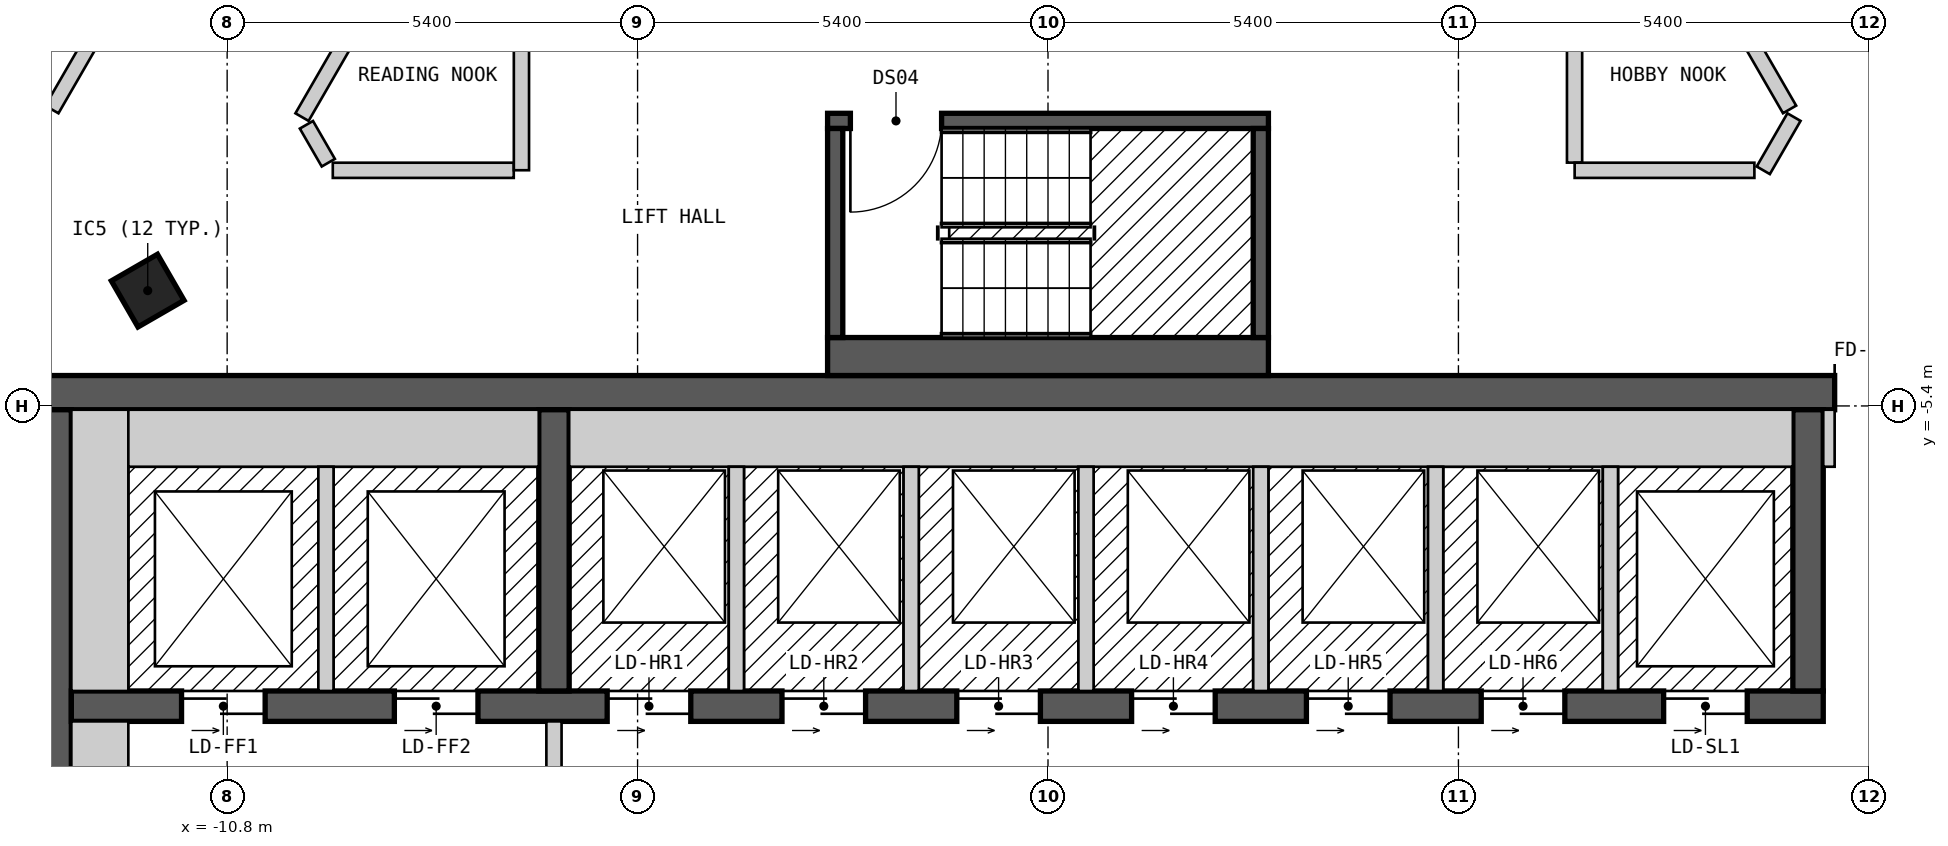
"""IFC4 building model, lengths in metres.
Left out: names, types, materials, properties, quantities, classifications, styles, units other than length and angle.
Written with IfcOpenShell. Run it as: python <this file> out.ifc"""

import sys

from ifc_helpers import new_model, si_unit, direction, frame, frame_2d, origin, origin_2d, place, context, subcontext, project, spatial, rectangle, extrude, element, fill, save


model = new_model("IFC4")
c1 = context("Model", 3, precision=1e-05, world=origin(), true_north=direction((0.0, 1.0)))
c2 = subcontext(c1, "Body", "Model", "MODEL_VIEW")
j1 = project(units=[si_unit("LENGTHUNIT", "METRE"), si_unit("PLANEANGLEUNIT", "RADIAN")], contexts=[c1])
p1 = place(None, origin())
s1 = spatial("IfcSite", under=j1, at=p1, CompositionType="ELEMENT")
p2 = place(p1, origin())
s2 = spatial("IfcBuilding", under=s1, at=p2, CompositionType="ELEMENT")
p3 = place(p2, frame((0.0, 0.0, 229.8)))
s3 = spatial("IfcBuildingStorey", under=s2, at=p3, CompositionType="ELEMENT", Elevation=229.8)
p4 = place(p3, frame((-11.845, -3.883, 0.0), z_axis=(0.0, 0.0, 1.0), x_axis=(0.499984884929, -0.866034130299, 0.0)))
e1 = element("IfcColumn", 1, at=p4, inside=s3, PredefinedType="COLUMN", context=c2, shape_type="SweptSolid", body=[
    extrude(rectangle(XDim=0.7, YDim=0.7, at=origin_2d()), origin(), (0.0, 0.0, 1.0), 3.0),
])
p5 = place(p3, frame((-13.3, -5.225, 0.0), z_axis=(0.0, 0.0, 1.0), x_axis=(1.0, 0.0, 0.0)))
e2 = element("IfcWall", 2, at=p5, inside=s3, PredefinedType="SHEAR", context=c2, shape_type="SweptSolid", body=[
    extrude(rectangle(XDim=26.6, YDim=0.45, at=frame_2d((13.3, 0.0))), origin(), (0.0, 0.0, 1.0), 2.7),
])
p6 = place(p5, frame((23.65, 0.0, 0.0)))
e3 = element("IfcOpeningElement", 3, at=p6, cuts=e2, PredefinedType="OPENING", context=c2, shape_type="SweptSolid", body=[
    extrude(rectangle(XDim=1.2, YDim=2.1, at=frame_2d((0.6, 1.05))), frame((0.0, 0.235, 0.0), z_axis=(0.0, -1.0, 0.0), x_axis=(1.0, 0.0, 0.0)), (0.0, 0.0, 1.0), 0.47),
])
p7 = place(p3, frame((-13.075, -18.55, 0.0), z_axis=(0.0, 0.0, 1.0), x_axis=(0.0, 1.0, 0.0)))
e4 = element("IfcWall", 4, at=p7, inside=s3, PredefinedType="SHEAR", context=c2, shape_type="SweptSolid", body=[
    extrude(rectangle(XDim=13.1, YDim=0.45, at=frame_2d((6.55, 0.0))), origin(), (0.0, 0.0, 1.0), 2.7),
])
p8 = place(p7, frame((4.35, 0.0, 0.0)))
e5 = element("IfcOpeningElement", 5, at=p8, cuts=e4, PredefinedType="OPENING", context=c2, shape_type="SweptSolid", body=[
    extrude(rectangle(XDim=1.2, YDim=2.1, at=frame_2d((0.6, 1.05))), frame((0.0, 0.235, 0.0), z_axis=(0.0, -1.0, 0.0), x_axis=(1.0, 0.0, 0.0)), (0.0, 0.0, 1.0), 0.47),
])
p9 = place(p3, frame((-12.85, -9.35, 0.0), z_axis=(0.0, 0.0, 1.0), x_axis=(1.0, 0.0, 0.0)))
e6 = element("IfcWall", 6, at=p9, inside=s3, PredefinedType="SHEAR", context=c2, shape_type="SweptSolid", body=[
    extrude(rectangle(XDim=23.05, YDim=0.4, at=frame_2d((11.525, 0.0))), origin(), (0.0, 0.0, 1.0), 2.7),
])
p10 = place(p9, frame((1.45, 0.0, 0.0)))
e7 = element("IfcOpeningElement", 7, at=p10, cuts=e6, PredefinedType="OPENING", context=c2, shape_type="SweptSolid", body=[
    extrude(rectangle(XDim=1.1, YDim=2.1, at=frame_2d((0.55, 1.05))), frame((0.0, 0.21, 0.0), z_axis=(0.0, -1.0, 0.0), x_axis=(1.0, 0.0, 0.0)), (0.0, 0.0, 1.0), 0.42),
])
p11 = place(p9, frame((4.25, 0.0, 0.0)))
e8 = element("IfcOpeningElement", 8, at=p11, cuts=e6, PredefinedType="OPENING", context=c2, shape_type="SweptSolid", body=[
    extrude(rectangle(XDim=1.1, YDim=2.1, at=frame_2d((0.55, 1.05))), frame((0.0, 0.21, 0.0), z_axis=(0.0, -1.0, 0.0), x_axis=(1.0, 0.0, 0.0)), (0.0, 0.0, 1.0), 0.42),
])
p12 = place(p9, frame((7.05, 0.0, 0.0)))
e9 = element("IfcOpeningElement", 9, at=p12, cuts=e6, PredefinedType="OPENING", context=c2, shape_type="SweptSolid", body=[
    extrude(rectangle(XDim=1.1, YDim=2.1, at=frame_2d((0.55, 1.05))), frame((0.0, 0.21, 0.0), z_axis=(0.0, -1.0, 0.0), x_axis=(1.0, 0.0, 0.0)), (0.0, 0.0, 1.0), 0.42),
])
p13 = place(p9, frame((9.35, 0.0, 0.0)))
e10 = element("IfcOpeningElement", 10, at=p13, cuts=e6, PredefinedType="OPENING", context=c2, shape_type="SweptSolid", body=[
    extrude(rectangle(XDim=1.1, YDim=2.1, at=frame_2d((0.55, 1.05))), frame((0.0, 0.21, 0.0), z_axis=(0.0, -1.0, 0.0), x_axis=(1.0, 0.0, 0.0)), (0.0, 0.0, 1.0), 0.42),
])
p14 = place(p9, frame((11.65, 0.0, 0.0)))
e11 = element("IfcOpeningElement", 11, at=p14, cuts=e6, PredefinedType="OPENING", context=c2, shape_type="SweptSolid", body=[
    extrude(rectangle(XDim=1.1, YDim=2.1, at=frame_2d((0.55, 1.05))), frame((0.0, 0.21, 0.0), z_axis=(0.0, -1.0, 0.0), x_axis=(1.0, 0.0, 0.0)), (0.0, 0.0, 1.0), 0.42),
])
p15 = place(p9, frame((13.95, 0.0, 0.0)))
e12 = element("IfcOpeningElement", 12, at=p15, cuts=e6, PredefinedType="OPENING", context=c2, shape_type="SweptSolid", body=[
    extrude(rectangle(XDim=1.1, YDim=2.1, at=frame_2d((0.55, 1.05))), frame((0.0, 0.21, 0.0), z_axis=(0.0, -1.0, 0.0), x_axis=(1.0, 0.0, 0.0)), (0.0, 0.0, 1.0), 0.42),
])
p16 = place(p9, frame((16.25, 0.0, 0.0)))
e13 = element("IfcOpeningElement", 13, at=p16, cuts=e6, PredefinedType="OPENING", context=c2, shape_type="SweptSolid", body=[
    extrude(rectangle(XDim=1.1, YDim=2.1, at=frame_2d((0.55, 1.05))), frame((0.0, 0.21, 0.0), z_axis=(0.0, -1.0, 0.0), x_axis=(1.0, 0.0, 0.0)), (0.0, 0.0, 1.0), 0.42),
])
p17 = place(p9, frame((18.55, 0.0, 0.0)))
e14 = element("IfcOpeningElement", 14, at=p17, cuts=e6, PredefinedType="OPENING", context=c2, shape_type="SweptSolid", body=[
    extrude(rectangle(XDim=1.1, YDim=2.1, at=frame_2d((0.55, 1.05))), frame((0.0, 0.21, 0.0), z_axis=(0.0, -1.0, 0.0), x_axis=(1.0, 0.0, 0.0)), (0.0, 0.0, 1.0), 0.42),
])
p18 = place(p9, frame((20.95, 0.0, 0.0)))
e15 = element("IfcOpeningElement", 15, at=p18, cuts=e6, PredefinedType="OPENING", context=c2, shape_type="SweptSolid", body=[
    extrude(rectangle(XDim=1.1, YDim=2.1, at=frame_2d((0.55, 1.05))), frame((0.0, 0.21, 0.0), z_axis=(0.0, -1.0, 0.0), x_axis=(1.0, 0.0, 0.0)), (0.0, 0.0, 1.0), 0.42),
])
for number, where, z_axis, x_axis in (
    (16, (-6.5, -9.15, 0.0), (0.0, 0.0, 1.0), (0.0, 1.0, 0.0)),
    (17, (10.0, -9.15, 0.0), (0.0, 0.0, 1.0), (0.0, 1.0, 0.0)),
):
    element("IfcWall", number, at=place(p3, frame(where, z_axis=z_axis, x_axis=x_axis)), inside=s3, PredefinedType="SHEAR", context=c2, shape_type="SweptSolid", body=[
        extrude(rectangle(XDim=3.7, YDim=0.4, at=frame_2d((1.85, 0.0))), origin(), (0.0, 0.0, 1.0), 2.7),
    ])
p19 = place(p3, frame((-2.9, -4.75, 0.0), z_axis=(0.0, 0.0, 1.0), x_axis=(1.0, 0.0, 0.0)))
e18 = element("IfcWall", 18, at=p19, inside=s3, PredefinedType="SOLIDWALL", context=c2, shape_type="SweptSolid", body=[
    extrude(rectangle(XDim=5.8, YDim=0.5, at=frame_2d((2.9, 0.0))), origin(), (0.0, 0.0, 1.0), 2.7),
])
p20 = place(p3, frame((-2.9, -1.65, 0.0), z_axis=(0.0, 0.0, 1.0), x_axis=(1.0, 0.0, 0.0)))
e19 = element("IfcWall", 19, at=p20, inside=s3, PredefinedType="SOLIDWALL", context=c2, shape_type="SweptSolid", body=[
    extrude(rectangle(XDim=5.8, YDim=0.2, at=frame_2d((2.9, 0.0))), origin(), (0.0, 0.0, 1.0), 2.7),
])
p21 = place(p20, frame((0.3, 0.0, 0.0)))
e20 = element("IfcOpeningElement", 20, at=p21, cuts=e19, PredefinedType="OPENING", context=c2, shape_type="SweptSolid", body=[
    extrude(rectangle(XDim=1.2, YDim=2.1, at=frame_2d((0.6, 1.05))), frame((0.0, 0.11, 0.0), z_axis=(0.0, -1.0, 0.0), x_axis=(1.0, 0.0, 0.0)), (0.0, 0.0, 1.0), 0.22),
])
for number, where, z_axis, x_axis in (
    (21, (-2.8, -4.5, 0.0), (0.0, 0.0, 1.0), (0.0, 1.0, 0.0)),
    (22, (2.8, -4.5, 0.0), (0.0, 0.0, 1.0), (0.0, 1.0, 0.0)),
):
    element("IfcWall", number, at=place(p3, frame(where, z_axis=z_axis, x_axis=x_axis)), inside=s3, PredefinedType="SOLIDWALL", context=c2, shape_type="SweptSolid", body=[
        extrude(rectangle(XDim=2.75, YDim=0.2, at=frame_2d((1.375, 0.0))), origin(), (0.0, 0.0, 1.0), 2.7),
    ])
p22 = place(p3, frame((-9.757, -1.701, 0.0), z_axis=(0.0, 0.0, 1.0), x_axis=(0.49996696679, -0.866044474677, 0.0)))
e23 = element("IfcWall", 23, at=p22, inside=s3, PredefinedType="PARTITIONING", context=c2, shape_type="SweptSolid", body=[
    extrude(rectangle(XDim=0.576, YDim=0.2, at=frame_2d((0.288, 0.0))), origin(), (0.0, 0.0, 1.0), 2.7),
])
p23 = place(p3, frame((7.622, 2.199, 0.0), z_axis=(0.0, 0.0, 1.0), x_axis=(0.499994660107, -0.866028486751, 0.0)))
e24 = element("IfcWall", 24, at=p23, inside=s3, PredefinedType="PARTITIONING", context=c2, shape_type="SweptSolid", body=[
    extrude(rectangle(XDim=4.27, YDim=0.2, at=frame_2d((2.135, 0.0))), origin(), (0.0, 0.0, 1.0), 2.7),
])
p24 = place(p23, frame((1.685, 0.0, 0.0)))
e25 = element("IfcOpeningElement", 25, at=p24, cuts=e24, PredefinedType="OPENING", context=c2, shape_type="SweptSolid", body=[
    extrude(rectangle(XDim=0.9, YDim=2.1, at=frame_2d((0.45, 1.05))), frame((0.0, 0.11, 0.0), z_axis=(0.0, -1.0, 0.0), x_axis=(1.0, 0.0, 0.0)), (0.0, 0.0, 1.0), 0.22),
])
p25 = place(p3, frame((9.238, 5.2, 0.0), z_axis=(0.0, 0.0, 1.0), x_axis=(0.500025705601, -0.86601056214, 0.0)))
e26 = element("IfcWall", 26, at=p25, inside=s3, PredefinedType="PARTITIONING", context=c2, shape_type="SweptSolid", body=[
    extrude(rectangle(XDim=7.735, YDim=0.2, at=frame_2d((3.868, 0.0))), origin(), (0.0, 0.0, 1.0), 2.7),
])
p26 = place(p25, frame((6.898, 0.0, 0.0)))
e27 = element("IfcOpeningElement", 27, at=p26, cuts=e26, PredefinedType="OPENING", context=c2, shape_type="SweptSolid", body=[
    extrude(rectangle(XDim=0.8, YDim=2.1, at=frame_2d((0.4, 1.05))), frame((0.0, 0.11, 0.0), z_axis=(0.0, -1.0, 0.0), x_axis=(1.0, 0.0, 0.0)), (0.0, 0.0, 1.0), 0.22),
])
p27 = place(p25, frame((1.988, 0.0, 0.0)))
e28 = element("IfcOpeningElement", 28, at=p27, cuts=e26, PredefinedType="OPENING", context=c2, shape_type="SweptSolid", body=[
    extrude(rectangle(XDim=1.0, YDim=2.1, at=frame_2d((0.5, 1.05))), frame((0.0, 0.11, 0.0), z_axis=(0.0, -1.0, 0.0), x_axis=(1.0, 0.0, 0.0)), (0.0, 0.0, 1.0), 0.22),
])
p28 = place(p3, frame((6.928, 1.0, 0.0), z_axis=(0.0, 0.0, 1.0), x_axis=(0.0, -1.0, 0.0)))
e29 = element("IfcWall", 29, at=p28, inside=s3, PredefinedType="PARTITIONING", context=c2, shape_type="SweptSolid", body=[
    extrude(rectangle(XDim=3.199, YDim=0.2, at=frame_2d((1.6, 0.0))), origin(), (0.0, 0.0, 1.0), 2.7),
])
p29 = place(p3, frame((-9.41, -2.3, 0.0), z_axis=(0.0, 0.0, 1.0), x_axis=(1.0, 0.0, 0.0)))
e30 = element("IfcWall", 30, at=p29, inside=s3, PredefinedType="PARTITIONING", context=c2, shape_type="SweptSolid", body=[
    extrude(rectangle(XDim=2.381, YDim=0.2, at=frame_2d((1.19, 0.0))), origin(), (0.0, 0.0, 1.0), 2.7),
])
p30 = place(p3, frame((6.929, -2.3, 0.0), z_axis=(0.0, 0.0, 1.0), x_axis=(1.0, 0.0, 0.0)))
e31 = element("IfcWall", 31, at=p30, inside=s3, PredefinedType="PARTITIONING", context=c2, shape_type="SweptSolid", body=[
    extrude(rectangle(XDim=2.365, YDim=0.2, at=frame_2d((1.183, 0.0))), origin(), (0.0, 0.0, 1.0), 2.7),
])
p31 = place(p3, frame((9.411, -2.3, 0.0), z_axis=(0.0, 0.0, 1.0), x_axis=(0.499940363534, 0.866059832176, 0.0)))
e32 = element("IfcWall", 32, at=p31, inside=s3, PredefinedType="PARTITIONING", context=c2, shape_type="SweptSolid", body=[
    extrude(rectangle(XDim=0.808, YDim=0.2, at=frame_2d((0.404, 0.0))), origin(), (0.0, 0.0, 1.0), 2.7),
])
p32 = place(p3, frame((-9.815, -1.6, 0.0), z_axis=(0.0, 0.0, 1.0), x_axis=(0.500058909736, 0.865991389561, 0.0)))
e33 = element("IfcWall", 33, at=p32, inside=s3, PredefinedType="PARTITIONING", context=c2, shape_type="SweptSolid", body=[
    extrude(rectangle(XDim=4.501, YDim=0.2, at=frame_2d((2.251, 0.0))), origin(), (0.0, 0.0, 1.0), 2.7),
])
p33 = place(p32, frame((1.801, 0.0, 0.0)))
e34 = element("IfcOpeningElement", 34, at=p33, cuts=e33, PredefinedType="OPENING", context=c2, shape_type="SweptSolid", body=[
    extrude(rectangle(XDim=0.9, YDim=2.1, at=frame_2d((0.45, 1.05))), frame((0.0, 0.11, 0.0), z_axis=(0.0, -1.0, 0.0), x_axis=(1.0, 0.0, 0.0)), (0.0, 0.0, 1.0), 0.22),
])
p34 = place(p3, frame((-13.106, -1.5, 0.0), z_axis=(0.0, 0.0, 1.0), x_axis=(0.500025705601, 0.86601056214, 0.0)))
e35 = element("IfcWall", 35, at=p34, inside=s3, PredefinedType="PARTITIONING", context=c2, shape_type="SweptSolid", body=[
    extrude(rectangle(XDim=7.735, YDim=0.2, at=frame_2d((3.868, 0.0))), origin(), (0.0, 0.0, 1.0), 2.7),
])
p35 = place(p3, frame((-6.928, -2.299, 0.0), z_axis=(0.0, 0.0, 1.0), x_axis=(0.0, 1.0, 0.0)))
e36 = element("IfcWall", 36, at=p35, inside=s3, PredefinedType="PARTITIONING", context=c2, shape_type="SweptSolid", body=[
    extrude(rectangle(XDim=3.499, YDim=0.2, at=frame_2d((1.75, 0.0))), origin(), (0.0, 0.0, 1.0), 2.7),
])
p36 = place(p3, frame((-12.475, -13.0, 0.0), z_axis=(0.0, 0.0, 1.0), x_axis=(0.0, 1.0, 0.0)))
e37 = element("IfcWall", 37, at=p36, inside=s3, PredefinedType="PARTITIONING", context=c2, shape_type="SweptSolid", body=[
    extrude(rectangle(XDim=3.45, YDim=0.75, at=frame_2d((1.725, 0.0))), origin(), (0.0, 0.0, 1.0), 2.7),
])
p37 = place(p3, frame((-12.475, -9.15, 0.0), z_axis=(0.0, 0.0, 1.0), x_axis=(0.0, 1.0, 0.0)))
e38 = element("IfcWall", 38, at=p37, inside=s3, PredefinedType="SOLIDWALL", context=c2, shape_type="SweptSolid", body=[
    extrude(rectangle(XDim=3.7, YDim=0.75, at=frame_2d((1.85, 0.0))), origin(), (0.0, 0.0, 1.0), 2.7),
])
p38 = place(p3, frame((-12.1, -5.825, 0.0), z_axis=(0.0, 0.0, 1.0), x_axis=(1.0, 0.0, 0.0)))
e39 = element("IfcWall", 39, at=p38, inside=s3, PredefinedType="SOLIDWALL", context=c2, shape_type="SweptSolid", body=[
    extrude(rectangle(XDim=5.4, YDim=0.75, at=frame_2d((2.7, 0.0))), origin(), (0.0, 0.0, 1.0), 2.7),
])
p39 = place(p3, frame((-9.5, -9.15, 0.0), z_axis=(0.0, 0.0, 1.0), x_axis=(0.0, 1.0, 0.0)))
e40 = element("IfcWall", 40, at=p39, inside=s3, PredefinedType="SOLIDWALL", context=c2, shape_type="SweptSolid", body=[
    extrude(rectangle(XDim=2.95, YDim=0.2, at=frame_2d((1.475, 0.0))), origin(), (0.0, 0.0, 1.0), 2.7),
])
p40 = place(p3, frame((-6.5, -14.45, 0.0), z_axis=(0.0, 0.0, 1.0), x_axis=(0.0, 1.0, 0.0)))
e41 = element("IfcWall", 41, at=p40, inside=s3, PredefinedType="PARTITIONING", context=c2, shape_type="SweptSolid", body=[
    extrude(rectangle(XDim=4.9, YDim=0.2, at=frame_2d((2.45, 0.0))), origin(), (0.0, 0.0, 1.0), 2.7),
])
p41 = place(p40, frame((3.15, 0.0, 0.0), z_axis=(0.0, 0.0, 1.0), x_axis=(-1.0, 0.0, 0.0)))
e42 = element("IfcOpeningElement", 42, at=p41, cuts=e41, PredefinedType="OPENING", context=c2, shape_type="SweptSolid", body=[
    extrude(rectangle(XDim=1.4, YDim=2.1, at=frame_2d((0.7, 1.05))), frame((0.0, 0.11, 0.0), z_axis=(0.0, -1.0, 0.0), x_axis=(1.0, 0.0, 0.0)), (0.0, 0.0, 1.0), 0.22),
])
p42 = place(p3, frame((-6.3, -5.825, 0.0), z_axis=(0.0, 0.0, 1.0), x_axis=(1.0, 0.0, 0.0)))
e43 = element("IfcWall", 43, at=p42, inside=s3, PredefinedType="SOLIDWALL", context=c2, shape_type="SweptSolid", body=[
    extrude(rectangle(XDim=16.1, YDim=0.75, at=frame_2d((8.05, 0.0))), origin(), (0.0, 0.0, 1.0), 2.7),
])
for number, where, z_axis, x_axis in (
    (44, (-4.1, -9.15, 0.0), (0.0, 0.0, 1.0), (0.0, 1.0, 0.0)),
    (45, (-1.8, -9.15, 0.0), (0.0, 0.0, 1.0), (0.0, 1.0, 0.0)),
    (46, (0.5, -9.15, 0.0), (0.0, 0.0, 1.0), (0.0, 1.0, 0.0)),
    (47, (2.8, -9.15, 0.0), (0.0, 0.0, 1.0), (0.0, 1.0, 0.0)),
    (48, (5.1, -9.15, 0.0), (0.0, 0.0, 1.0), (0.0, 1.0, 0.0)),
    (49, (7.4, -9.15, 0.0), (0.0, 0.0, 1.0), (0.0, 1.0, 0.0)),
):
    element("IfcWall", number, at=place(p3, frame(where, z_axis=z_axis, x_axis=x_axis)), inside=s3, PredefinedType="SOLIDWALL", context=c2, shape_type="SweptSolid", body=[
        extrude(rectangle(XDim=2.95, YDim=0.2, at=frame_2d((1.475, 0.0))), origin(), (0.0, 0.0, 1.0), 2.7),
    ])
p43 = place(p3, frame((10.275, -6.2, 0.0), z_axis=(0.0, 0.0, 1.0), x_axis=(0.0, 1.0, 0.0)))
e50 = element("IfcWall", 50, at=p43, inside=s3, PredefinedType="PARTITIONING", context=c2, shape_type="SweptSolid", body=[
    extrude(rectangle(XDim=0.75, YDim=0.15, at=frame_2d((0.375, 0.0))), origin(), (0.0, 0.0, 1.0), 2.7),
])
p44 = place(p21, origin())
e51 = element("IfcDoor", 51, at=p44, inside=s3, OperationType="SINGLE_SWING_LEFT", PredefinedType="DOOR", context=c2, shape_type="SweptSolid", body=[
    extrude(rectangle(XDim=1.2, YDim=2.1, at=frame_2d((0.6, 1.05))), frame((0.0, 0.025, 0.0), z_axis=(0.0, -1.0, 0.0), x_axis=(1.0, 0.0, 0.0)), (0.0, 0.0, 1.0), 0.05),
])
fill(e20, e51)
p45 = place(p10, origin())
e52 = element("IfcDoor", 52, at=p45, inside=s3, OperationType="DOUBLE_DOOR_SLIDING", PredefinedType="DOOR", context=c2, shape_type="SweptSolid", body=[
    extrude(rectangle(XDim=1.1, YDim=2.1, at=frame_2d((0.55, 1.05))), frame((0.0, 0.025, 0.0), z_axis=(0.0, -1.0, 0.0), x_axis=(1.0, 0.0, 0.0)), (0.0, 0.0, 1.0), 0.05),
])
fill(e7, e52)
p46 = place(p11, origin())
e53 = element("IfcDoor", 53, at=p46, inside=s3, OperationType="DOUBLE_DOOR_SLIDING", PredefinedType="DOOR", context=c2, shape_type="SweptSolid", body=[
    extrude(rectangle(XDim=1.1, YDim=2.1, at=frame_2d((0.55, 1.05))), frame((0.0, 0.025, 0.0), z_axis=(0.0, -1.0, 0.0), x_axis=(1.0, 0.0, 0.0)), (0.0, 0.0, 1.0), 0.05),
])
fill(e8, e53)
p47 = place(p12, origin())
e54 = element("IfcDoor", 54, at=p47, inside=s3, OperationType="DOUBLE_DOOR_SLIDING", PredefinedType="DOOR", context=c2, shape_type="SweptSolid", body=[
    extrude(rectangle(XDim=1.1, YDim=2.1, at=frame_2d((0.55, 1.05))), frame((0.0, 0.025, 0.0), z_axis=(0.0, -1.0, 0.0), x_axis=(1.0, 0.0, 0.0)), (0.0, 0.0, 1.0), 0.05),
])
fill(e9, e54)
p48 = place(p13, origin())
e55 = element("IfcDoor", 55, at=p48, inside=s3, OperationType="DOUBLE_DOOR_SLIDING", PredefinedType="DOOR", context=c2, shape_type="SweptSolid", body=[
    extrude(rectangle(XDim=1.1, YDim=2.1, at=frame_2d((0.55, 1.05))), frame((0.0, 0.025, 0.0), z_axis=(0.0, -1.0, 0.0), x_axis=(1.0, 0.0, 0.0)), (0.0, 0.0, 1.0), 0.05),
])
fill(e10, e55)
p49 = place(p14, origin())
e56 = element("IfcDoor", 56, at=p49, inside=s3, OperationType="DOUBLE_DOOR_SLIDING", PredefinedType="DOOR", context=c2, shape_type="SweptSolid", body=[
    extrude(rectangle(XDim=1.1, YDim=2.1, at=frame_2d((0.55, 1.05))), frame((0.0, 0.025, 0.0), z_axis=(0.0, -1.0, 0.0), x_axis=(1.0, 0.0, 0.0)), (0.0, 0.0, 1.0), 0.05),
])
fill(e11, e56)
p50 = place(p15, origin())
e57 = element("IfcDoor", 57, at=p50, inside=s3, OperationType="DOUBLE_DOOR_SLIDING", PredefinedType="DOOR", context=c2, shape_type="SweptSolid", body=[
    extrude(rectangle(XDim=1.1, YDim=2.1, at=frame_2d((0.55, 1.05))), frame((0.0, 0.025, 0.0), z_axis=(0.0, -1.0, 0.0), x_axis=(1.0, 0.0, 0.0)), (0.0, 0.0, 1.0), 0.05),
])
fill(e12, e57)
p51 = place(p16, origin())
e58 = element("IfcDoor", 58, at=p51, inside=s3, OperationType="DOUBLE_DOOR_SLIDING", PredefinedType="DOOR", context=c2, shape_type="SweptSolid", body=[
    extrude(rectangle(XDim=1.1, YDim=2.1, at=frame_2d((0.55, 1.05))), frame((0.0, 0.025, 0.0), z_axis=(0.0, -1.0, 0.0), x_axis=(1.0, 0.0, 0.0)), (0.0, 0.0, 1.0), 0.05),
])
fill(e13, e58)
p52 = place(p17, origin())
e59 = element("IfcDoor", 59, at=p52, inside=s3, OperationType="DOUBLE_DOOR_SLIDING", PredefinedType="DOOR", context=c2, shape_type="SweptSolid", body=[
    extrude(rectangle(XDim=1.1, YDim=2.1, at=frame_2d((0.55, 1.05))), frame((0.0, 0.025, 0.0), z_axis=(0.0, -1.0, 0.0), x_axis=(1.0, 0.0, 0.0)), (0.0, 0.0, 1.0), 0.05),
])
fill(e14, e59)
p53 = place(p18, origin())
e60 = element("IfcDoor", 60, at=p53, inside=s3, OperationType="DOUBLE_DOOR_SLIDING", PredefinedType="DOOR", context=c2, shape_type="SweptSolid", body=[
    extrude(rectangle(XDim=1.1, YDim=2.1, at=frame_2d((0.55, 1.05))), frame((0.0, 0.025, 0.0), z_axis=(0.0, -1.0, 0.0), x_axis=(1.0, 0.0, 0.0)), (0.0, 0.0, 1.0), 0.05),
])
fill(e15, e60)
p54 = place(p6, origin())
e61 = element("IfcDoor", 61, at=p54, inside=s3, OperationType="DOUBLE_DOOR_SINGLE_SWING", PredefinedType="DOOR", context=c2, shape_type="SweptSolid", body=[
    extrude(rectangle(XDim=1.2, YDim=2.1, at=frame_2d((0.6, 1.05))), frame((0.0, 0.025, 0.0), z_axis=(0.0, -1.0, 0.0), x_axis=(1.0, 0.0, 0.0)), (0.0, 0.0, 1.0), 0.05),
])
fill(e3, e61)
save(model, sys.argv[1])
